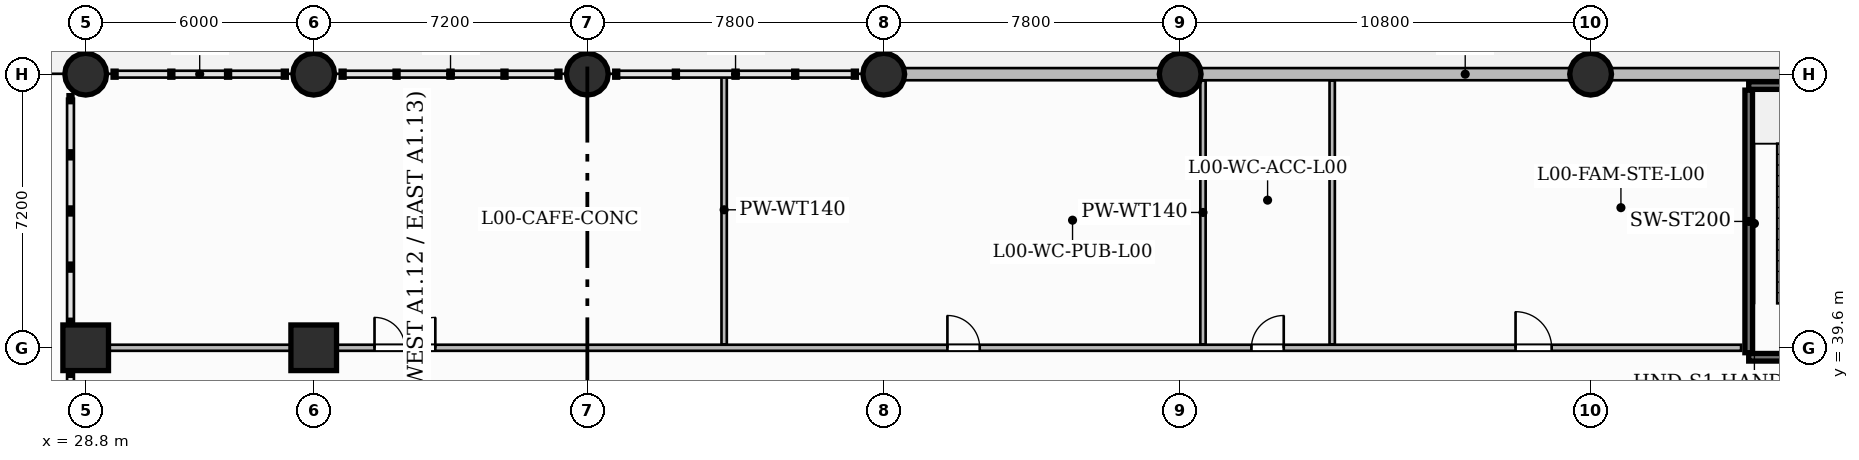
"""IFC4 building model, lengths in metres.
Left out: names, types, materials, properties, quantities, classifications, styles, units other than length and angle.
Written with IfcOpenShell. Run it as: python <this file> out.ifc"""

import sys

from ifc_helpers import new_model, si_unit, direction, frame, frame_2d, origin, origin_2d, place, context, subcontext, project, spatial, rectangle, circle, extrude, source, transform, mapped, element, fill, save


model = new_model("IFC4")
c1 = context("Model", 3, precision=1e-05, world=origin(), true_north=direction((0.0, 1.0)))
c2 = subcontext(c1, "Body", "Model", "MODEL_VIEW")
j1 = project(units=[si_unit("LENGTHUNIT", "METRE"), si_unit("PLANEANGLEUNIT", "RADIAN")], contexts=[c1])
p1 = place(None, origin())
s1 = spatial("IfcSite", under=j1, at=p1, CompositionType="ELEMENT")
p2 = place(p1, origin())
s2 = spatial("IfcBuilding", under=s1, at=p2, CompositionType="ELEMENT")
p3 = place(p2, origin())
s3 = spatial("IfcBuildingStorey", under=s2, at=p3, CompositionType="ELEMENT", Elevation=0.0)
m1 = source(origin(), c2, "Body", "SweptSolid", [
    extrude(rectangle(XDim=1.2, YDim=1.2, at=origin_2d()), origin(), (0.0, 0.0, 1.0), 5.4),
])
p4 = place(p3, frame((28.8, 39.6, 0.0), z_axis=(0.0, 0.0, 1.0), x_axis=(1.0, 0.0, 0.0)))
e1 = element("IfcColumn", 1, at=p4, inside=s3, PredefinedType="COLUMN", context=c2, shape_type="MappedRepresentation", body=[
    mapped(m1, transform((0.0, 0.0, 0.0), scale=1.0)),
])
m2 = source(origin(), c2, "Body", "SweptSolid", [
    extrude(circle(Radius=0.55, at=origin_2d()), origin(), (0.0, 0.0, 1.0), 5.4),
])
p5 = place(p3, frame((28.8, 46.8, 0.0), z_axis=(0.0, 0.0, 1.0), x_axis=(1.0, 0.0, 0.0)))
e2 = element("IfcColumn", 2, at=p5, inside=s3, PredefinedType="COLUMN", context=c2, shape_type="MappedRepresentation", body=[
    mapped(m2, transform((0.0, 0.0, 0.0), scale=1.0)),
])
p6 = place(p3, frame((34.8, 39.6, 0.0), z_axis=(0.0, 0.0, 1.0), x_axis=(1.0, 0.0, 0.0)))
e3 = element("IfcColumn", 3, at=p6, inside=s3, PredefinedType="COLUMN", context=c2, shape_type="MappedRepresentation", body=[
    mapped(m1, transform((0.0, 0.0, 0.0), scale=1.0)),
])
for number, where, z_axis, x_axis in (
    (4, (34.8, 46.8, 0.0), (0.0, 0.0, 1.0), (1.0, 0.0, 0.0)),
    (5, (42.0, 46.8, 0.0), (0.0, 0.0, 1.0), (1.0, 0.0, 0.0)),
    (6, (49.8, 46.8, 0.0), (0.0, 0.0, 1.0), (1.0, 0.0, 0.0)),
    (7, (57.6, 46.8, 0.0), (0.0, 0.0, 1.0), (1.0, 0.0, 0.0)),
    (8, (68.4, 46.8, 0.0), (0.0, 0.0, 1.0), (1.0, 0.0, 0.0)),
):
    element("IfcColumn", number, at=place(p3, frame(where, z_axis=z_axis, x_axis=x_axis)), inside=s3, PredefinedType="COLUMN", context=c2, shape_type="MappedRepresentation", body=[
        mapped(m2, transform((0.0, 0.0, 0.0), scale=1.0)),
    ])
p7 = place(p3, frame((72.56, 39.47, 0.0), z_axis=(0.0, 0.0, 1.0), x_axis=(0.0, 1.0, 0.0)))
e9 = element("IfcWall", 9, at=p7, inside=s3, PredefinedType="SHEAR", context=c2, shape_type="SweptSolid", body=[
    extrude(rectangle(XDim=6.91, YDim=0.2, at=frame_2d((3.455, 0.0))), origin(), (0.0, 0.0, 1.0), 5.4),
])
p8 = place(p3, frame((72.56, 46.5, 0.0), z_axis=(0.0, 0.0, 1.0), x_axis=(1.0, 0.0, 0.0)))
e10 = element("IfcWall", 10, at=p8, inside=s3, PredefinedType="SHEAR", context=c2, shape_type="SweptSolid", body=[
    extrude(rectangle(XDim=2.94, YDim=0.2, at=frame_2d((1.47, 0.0))), origin(), (0.0, 0.0, 1.0), 5.4),
])
p9 = place(p3, frame((72.56, 39.35, 0.0), z_axis=(0.0, 0.0, 1.0), x_axis=(1.0, 0.0, 0.0)))
e11 = element("IfcWall", 11, at=p9, inside=s3, PredefinedType="SHEAR", context=c2, shape_type="SweptSolid", body=[
    extrude(rectangle(XDim=2.94, YDim=0.2, at=frame_2d((1.47, 0.0))), origin(), (0.0, 0.0, 1.0), 5.4),
])
p10 = place(p9, frame((0.985, 0.0, 0.0)))
e12 = element("IfcOpeningElement", 12, at=p10, cuts=e11, PredefinedType="OPENING", context=c2, shape_type="SweptSolid", body=[
    extrude(rectangle(XDim=1.05, YDim=2.2, at=frame_2d((0.525, 1.1))), frame((0.0, 0.11, 0.0), z_axis=(0.0, -1.0, 0.0), x_axis=(1.0, 0.0, 0.0)), (0.0, 0.0, 1.0), 0.22),
])
p11 = place(p3, frame((28.64, 39.6, 0.0), z_axis=(0.0, 0.0, 1.0), x_axis=(1.0, 0.0, 0.0)))
e13 = element("IfcWall", 13, at=p11, inside=s3, PredefinedType="PARTITIONING", context=c2, shape_type="SweptSolid", body=[
    extrude(rectangle(XDim=43.72, YDim=0.16, at=frame_2d((21.86, 0.0))), origin(), (0.0, 0.0, 1.0), 4.085),
])
p12 = place(p11, frame((7.76, 0.0, 0.0)))
e14 = element("IfcOpeningElement", 14, at=p12, cuts=e13, PredefinedType="OPENING", context=c2, shape_type="SweptSolid", body=[
    extrude(rectangle(XDim=1.6, YDim=2.4, at=frame_2d((0.8, 1.2))), frame((0.0, 0.09, 0.0), z_axis=(0.0, -1.0, 0.0), x_axis=(1.0, 0.0, 0.0)), (0.0, 0.0, 1.0), 0.18),
])
p13 = place(p11, frame((22.835, 0.0, 0.0)))
e15 = element("IfcOpeningElement", 15, at=p13, cuts=e13, PredefinedType="OPENING", context=c2, shape_type="SweptSolid", body=[
    extrude(rectangle(XDim=0.85, YDim=2.1, at=frame_2d((0.425, 1.05))), frame((0.0, 0.09, 0.0), z_axis=(0.0, -1.0, 0.0), x_axis=(1.0, 0.0, 0.0)), (0.0, 0.0, 1.0), 0.18),
])
p14 = place(p11, frame((30.835, 0.0, 0.0)))
e16 = element("IfcOpeningElement", 16, at=p14, cuts=e13, PredefinedType="OPENING", context=c2, shape_type="SweptSolid", body=[
    extrude(rectangle(XDim=0.85, YDim=2.1, at=frame_2d((0.425, 1.05))), frame((0.0, 0.09, 0.0), z_axis=(0.0, -1.0, 0.0), x_axis=(1.0, 0.0, 0.0)), (0.0, 0.0, 1.0), 0.18),
])
p15 = place(p11, frame((37.785, 0.0, 0.0)))
e17 = element("IfcOpeningElement", 17, at=p15, cuts=e13, PredefinedType="OPENING", context=c2, shape_type="SweptSolid", body=[
    extrude(rectangle(XDim=0.95, YDim=2.15, at=frame_2d((0.475, 1.075))), frame((0.0, 0.09, 0.0), z_axis=(0.0, -1.0, 0.0), x_axis=(1.0, 0.0, 0.0)), (0.0, 0.0, 1.0), 0.18),
])
p16 = place(p3, frame((45.6, 39.69, 0.0), z_axis=(0.0, 0.0, 1.0), x_axis=(0.0, 1.0, 0.0)))
e18 = element("IfcWall", 18, at=p16, inside=s3, PredefinedType="PARTITIONING", context=c2, shape_type="SweptSolid", body=[
    extrude(rectangle(XDim=7.082, YDim=0.14, at=frame_2d((3.541, 0.0))), origin(), (0.0, 0.0, 1.0), 5.1),
])
for number, where, z_axis, x_axis in (
    (19, (58.2, 39.69, 0.0), (0.0, 0.0, 1.0), (0.0, 1.0, 0.0)),
    (20, (61.6, 39.69, 0.0), (0.0, 0.0, 1.0), (0.0, 1.0, 0.0)),
):
    element("IfcWall", number, at=place(p3, frame(where, z_axis=z_axis, x_axis=x_axis)), inside=s3, PredefinedType="PARTITIONING", context=c2, shape_type="SweptSolid", body=[
        extrude(rectangle(XDim=6.942, YDim=0.14, at=frame_2d((3.471, 0.0))), origin(), (0.0, 0.0, 1.0), 5.1),
    ])
p17 = place(p3, frame((49.8, 46.8, 0.0), z_axis=(0.0, 0.0, 1.0), x_axis=(1.0, 0.0, 0.0)))
e21 = element("IfcWall", 21, at=p17, inside=s3, PredefinedType="SOLIDWALL", context=c2, shape_type="SweptSolid", body=[
    extrude(rectangle(XDim=30.6, YDim=0.32, at=frame_2d((15.3, 0.0))), origin(), (0.0, 0.0, 1.0), 4.085),
])
m3 = source(origin(), c2, "Body", "SweptSolid", [
    extrude(rectangle(XDim=1.6, YDim=2.4, at=frame_2d((0.8, 1.2))), frame((0.0, 0.025, 0.0), z_axis=(0.0, -1.0, 0.0), x_axis=(1.0, 0.0, 0.0)), (0.0, 0.0, 1.0), 0.05),
])
p18 = place(p12, origin())
e22 = element("IfcDoor", 22, at=p18, inside=s3, OperationType="DOUBLE_DOOR_SINGLE_SWING", PredefinedType="DOOR", context=c2, shape_type="MappedRepresentation", body=[
    mapped(m3, transform((0.0, 0.0, 0.0), scale=1.0)),
])
fill(e14, e22)
m4 = source(origin(), c2, "Body", "SweptSolid", [
    extrude(rectangle(XDim=0.85, YDim=2.1, at=frame_2d((0.425, 1.05))), frame((0.0, 0.025, 0.0), z_axis=(0.0, -1.0, 0.0), x_axis=(1.0, 0.0, 0.0)), (0.0, 0.0, 1.0), 0.05),
])
p19 = place(p13, origin())
e23 = element("IfcDoor", 23, at=p19, inside=s3, OperationType="SINGLE_SWING_LEFT", PredefinedType="DOOR", context=c2, shape_type="MappedRepresentation", body=[
    mapped(m4, transform((0.0, 0.0, 0.0), scale=1.0)),
])
fill(e15, e23)
p20 = place(p14, origin())
e24 = element("IfcDoor", 24, at=p20, inside=s3, OperationType="SINGLE_SWING_RIGHT", PredefinedType="DOOR", context=c2, shape_type="MappedRepresentation", body=[
    mapped(m4, transform((0.0, 0.0, 0.0), scale=1.0)),
])
fill(e16, e24)
m5 = source(origin(), c2, "Body", "SweptSolid", [
    extrude(rectangle(XDim=0.95, YDim=2.15, at=frame_2d((0.475, 1.075))), frame((0.0, 0.025, 0.0), z_axis=(0.0, -1.0, 0.0), x_axis=(1.0, 0.0, 0.0)), (0.0, 0.0, 1.0), 0.05),
])
p21 = place(p15, origin())
e25 = element("IfcDoor", 25, at=p21, inside=s3, OperationType="SINGLE_SWING_LEFT", PredefinedType="DOOR", context=c2, shape_type="MappedRepresentation", body=[
    mapped(m5, transform((0.0, 0.0, 0.0), scale=1.0)),
])
fill(e17, e25)
save(model, sys.argv[1])
